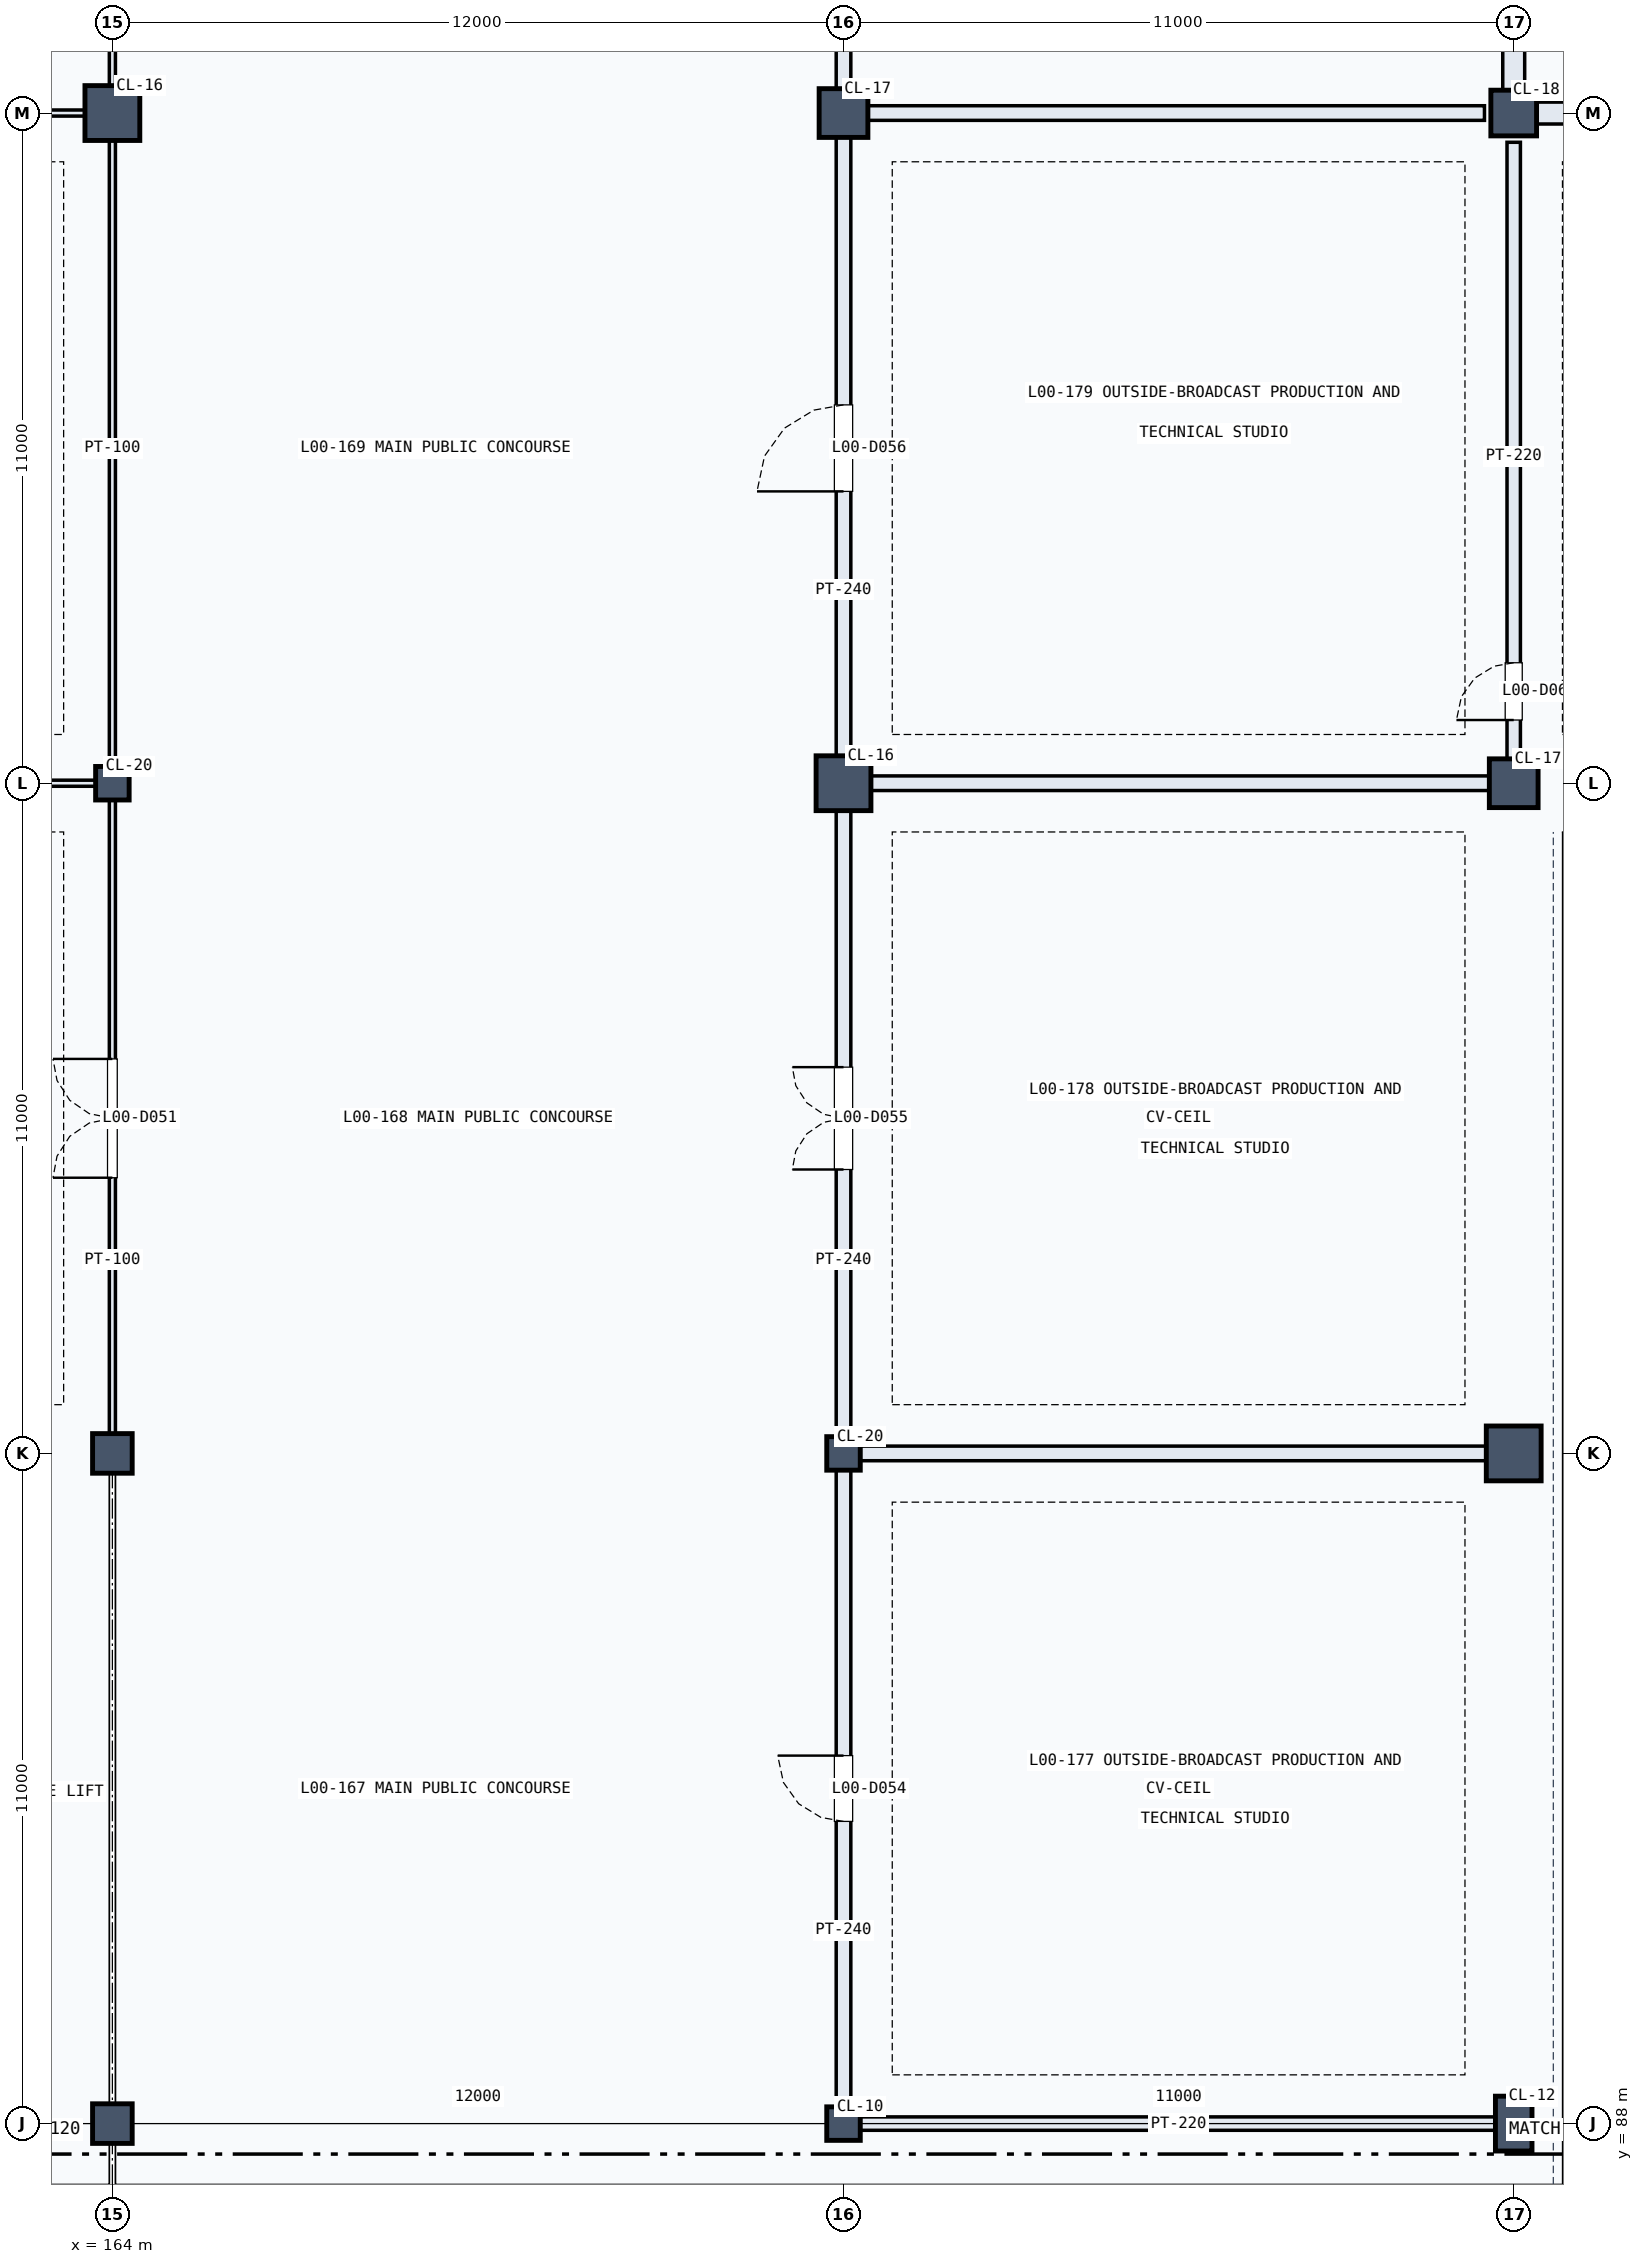
"""IFC4 building model, lengths in metres.
Left out: names, types, materials, properties, quantities, classifications, styles, units other than length and angle.
Written with IfcOpenShell. Run it as: python <this file> out.ifc"""

import sys

from ifc_helpers import new_model, si_unit, direction, frame, frame_2d, origin, origin_2d, place, context, subcontext, project, spatial, rectangle, circle, extrude, element, fill, save


model = new_model("IFC4")
c1 = context("Model", 3, precision=1e-05, world=origin(), true_north=direction((0.0, 1.0)))
c2 = subcontext(c1, "Body", "Model", "MODEL_VIEW")
j1 = project(units=[si_unit("LENGTHUNIT", "METRE"), si_unit("PLANEANGLEUNIT", "RADIAN")], contexts=[c1])
p1 = place(None, origin())
s1 = spatial("IfcSite", under=j1, at=p1, CompositionType="ELEMENT")
p2 = place(p1, origin())
s2 = spatial("IfcBuilding", under=s1, at=p2, CompositionType="ELEMENT")
p3 = place(p2, origin())
s3 = spatial("IfcBuildingStorey", under=s2, at=p3, CompositionType="ELEMENT", Elevation=0.0)
p4 = place(p3, frame((164.0, 88.0, 0.0), z_axis=(0.0, 0.0, 1.0), x_axis=(1.0, 0.0, 0.0)))
e1 = element("IfcColumn", 1, at=p4, inside=s3, PredefinedType="COLUMN", context=c2, shape_type="SweptSolid", body=[
    extrude(rectangle(XDim=0.65, YDim=0.65, at=origin_2d()), origin(), (0.0, 0.0, 1.0), 5.4),
])
p5 = place(p3, frame((164.0, 99.0, 0.0), z_axis=(0.0, 0.0, 1.0), x_axis=(1.0, 0.0, 0.0)))
e2 = element("IfcColumn", 2, at=p5, inside=s3, PredefinedType="COLUMN", context=c2, shape_type="SweptSolid", body=[
    extrude(circle(Radius=0.325, at=origin_2d()), origin(), (0.0, 0.0, 1.0), 5.4),
])
p6 = place(p3, frame((164.0, 110.0, 0.0), z_axis=(0.0, 0.0, 1.0), x_axis=(1.0, 0.0, 0.0)))
e3 = element("IfcColumn", 3, at=p6, inside=s3, PredefinedType="COLUMN", context=c2, shape_type="SweptSolid", body=[
    extrude(circle(Radius=0.275, at=origin_2d()), origin(), (0.0, 0.0, 1.0), 5.4),
])
p7 = place(p3, frame((164.0, 121.0, 0.0), z_axis=(0.0, 0.0, 1.0), x_axis=(1.0, 0.0, 0.0)))
e4 = element("IfcColumn", 4, at=p7, inside=s3, PredefinedType="COLUMN", context=c2, shape_type="SweptSolid", body=[
    extrude(circle(Radius=0.45, at=origin_2d()), origin(), (0.0, 0.0, 1.0), 5.4),
])
p8 = place(p3, frame((176.0, 88.0, 0.0), z_axis=(0.0, 0.0, 1.0), x_axis=(1.0, 0.0, 0.0)))
e5 = element("IfcColumn", 5, at=p8, inside=s3, PredefinedType="COLUMN", context=c2, shape_type="SweptSolid", body=[
    extrude(rectangle(XDim=0.55, YDim=0.55, at=origin_2d()), origin(), (0.0, 0.0, 1.0), 5.4),
])
p9 = place(p3, frame((176.0, 99.0, 0.0), z_axis=(0.0, 0.0, 1.0), x_axis=(1.0, 0.0, 0.0)))
e6 = element("IfcColumn", 6, at=p9, inside=s3, PredefinedType="COLUMN", context=c2, shape_type="SweptSolid", body=[
    extrude(circle(Radius=0.275, at=origin_2d()), origin(), (0.0, 0.0, 1.0), 5.4),
])
p10 = place(p3, frame((176.0, 110.0, 0.0), z_axis=(0.0, 0.0, 1.0), x_axis=(1.0, 0.0, 0.0)))
e7 = element("IfcColumn", 7, at=p10, inside=s3, PredefinedType="COLUMN", context=c2, shape_type="SweptSolid", body=[
    extrude(circle(Radius=0.45, at=origin_2d()), origin(), (0.0, 0.0, 1.0), 5.4),
])
p11 = place(p3, frame((176.0, 121.0, 0.0), z_axis=(0.0, 0.0, 1.0), x_axis=(1.0, 0.0, 0.0)))
e8 = element("IfcColumn", 8, at=p11, inside=s3, PredefinedType="COLUMN", context=c2, shape_type="SweptSolid", body=[
    extrude(circle(Radius=0.4, at=origin_2d()), origin(), (0.0, 0.0, 1.0), 5.4),
])
p12 = place(p3, frame((187.0, 88.0, 0.0), z_axis=(0.0, 0.0, 1.0), x_axis=(1.0, 0.0, 0.0)))
e9 = element("IfcColumn", 9, at=p12, inside=s3, PredefinedType="COLUMN", context=c2, shape_type="SweptSolid", body=[
    extrude(rectangle(XDim=0.6, YDim=0.9, at=origin_2d()), origin(), (0.0, 0.0, 1.0), 5.4),
])
p13 = place(p3, frame((187.0, 99.0, 0.0), z_axis=(0.0, 0.0, 1.0), x_axis=(1.0, 0.0, 0.0)))
e10 = element("IfcColumn", 10, at=p13, inside=s3, PredefinedType="COLUMN", context=c2, shape_type="SweptSolid", body=[
    extrude(circle(Radius=0.45, at=origin_2d()), origin(), (0.0, 0.0, 1.0), 5.4),
])
p14 = place(p3, frame((187.0, 110.0, 0.0), z_axis=(0.0, 0.0, 1.0), x_axis=(1.0, 0.0, 0.0)))
e11 = element("IfcColumn", 11, at=p14, inside=s3, PredefinedType="COLUMN", context=c2, shape_type="SweptSolid", body=[
    extrude(circle(Radius=0.4, at=origin_2d()), origin(), (0.0, 0.0, 1.0), 5.4),
])
p15 = place(p3, frame((187.0, 121.0, 0.0), z_axis=(0.0, 0.0, 1.0), x_axis=(1.0, 0.0, 0.0)))
e12 = element("IfcColumn", 12, at=p15, inside=s3, PredefinedType="COLUMN", context=c2, shape_type="SweptSolid", body=[
    extrude(circle(Radius=0.375, at=origin_2d()), origin(), (0.0, 0.0, 1.0), 5.4),
])
p16 = place(p3, frame((187.0, 121.22, 0.0), z_axis=(0.0, 0.0, 1.0), x_axis=(0.0, 1.0, 0.0)))
e13 = element("IfcWall", 13, at=p16, inside=s3, PredefinedType="SOLIDWALL", context=c2, shape_type="SweptSolid", body=[
    extrude(rectangle(XDim=10.56, YDim=0.36, at=frame_2d((5.28, 0.0))), origin(), (0.0, 0.0, 1.0), 4.55),
])
p17 = place(p16, frame((1.84, 0.0, 0.9)))
e14 = element("IfcOpeningElement", 14, at=p17, cuts=e13, PredefinedType="OPENING", context=c2, shape_type="SweptSolid", body=[
    extrude(rectangle(XDim=1.6, YDim=1.65, at=frame_2d((0.8, 0.825))), frame((0.0, 0.19, 0.0), z_axis=(0.0, -1.0, 0.0), x_axis=(1.0, 0.0, 0.0)), (0.0, 0.0, 1.0), 0.38),
])
p18 = place(p16, frame((4.48, 0.0, 0.9)))
e15 = element("IfcOpeningElement", 15, at=p18, cuts=e13, PredefinedType="OPENING", context=c2, shape_type="SweptSolid", body=[
    extrude(rectangle(XDim=1.6, YDim=1.65, at=frame_2d((0.8, 0.825))), frame((0.0, 0.19, 0.0), z_axis=(0.0, -1.0, 0.0), x_axis=(1.0, 0.0, 0.0)), (0.0, 0.0, 1.0), 0.38),
])
p19 = place(p16, frame((7.12, 0.0, 0.9)))
e16 = element("IfcOpeningElement", 16, at=p19, cuts=e13, PredefinedType="OPENING", context=c2, shape_type="SweptSolid", body=[
    extrude(rectangle(XDim=1.6, YDim=1.65, at=frame_2d((0.8, 0.825))), frame((0.0, 0.19, 0.0), z_axis=(0.0, -1.0, 0.0), x_axis=(1.0, 0.0, 0.0)), (0.0, 0.0, 1.0), 0.38),
])
p20 = place(p3, frame((187.22, 121.0, 0.0), z_axis=(0.0, 0.0, 1.0), x_axis=(1.0, 0.0, 0.0)))
e17 = element("IfcWall", 17, at=p20, inside=s3, PredefinedType="SOLIDWALL", context=c2, shape_type="SweptSolid", body=[
    extrude(rectangle(XDim=10.56, YDim=0.36, at=frame_2d((5.28, 0.0))), origin(), (0.0, 0.0, 1.0), 4.55),
])
p21 = place(p20, frame((2.88, 0.0, 0.0)))
e18 = element("IfcOpeningElement", 18, at=p21, cuts=e17, PredefinedType="OPENING", context=c2, shape_type="SweptSolid", body=[
    extrude(rectangle(XDim=4.8, YDim=4.35, at=frame_2d((2.4, 2.175))), frame((0.0, 0.19, 0.0), z_axis=(0.0, -1.0, 0.0), x_axis=(1.0, 0.0, 0.0)), (0.0, 0.0, 1.0), 0.38),
])
p22 = place(p3, frame((164.0, 99.22, 0.0), z_axis=(0.0, 0.0, 1.0), x_axis=(0.0, 1.0, 0.0)))
e19 = element("IfcWall", 19, at=p22, inside=s3, PredefinedType="PARTITIONING", context=c2, shape_type="SweptSolid", body=[
    extrude(rectangle(XDim=10.56, YDim=0.1, at=frame_2d((5.28, 0.0))), origin(), (0.0, 0.0, 1.0), 4.3),
])
p23 = place(p22, frame((4.305, 0.0, 0.0)))
e20 = element("IfcOpeningElement", 20, at=p23, cuts=e19, PredefinedType="OPENING", context=c2, shape_type="SweptSolid", body=[
    extrude(rectangle(XDim=1.95, YDim=2.4, at=frame_2d((0.975, 1.2))), frame((0.0, 0.06, 0.0), z_axis=(0.0, -1.0, 0.0), x_axis=(1.0, 0.0, 0.0)), (0.0, 0.0, 1.0), 0.12),
])
p24 = place(p3, frame((164.0, 110.22, 0.0), z_axis=(0.0, 0.0, 1.0), x_axis=(0.0, 1.0, 0.0)))
e21 = element("IfcWall", 21, at=p24, inside=s3, PredefinedType="PARTITIONING", context=c2, shape_type="SweptSolid", body=[
    extrude(rectangle(XDim=10.56, YDim=0.1, at=frame_2d((5.28, 0.0))), origin(), (0.0, 0.0, 1.0), 4.35),
])
p25 = place(p3, frame((164.0, 121.22, 0.0), z_axis=(0.0, 0.0, 1.0), x_axis=(0.0, 1.0, 0.0)))
e22 = element("IfcWall", 22, at=p25, inside=s3, PredefinedType="PARTITIONING", context=c2, shape_type="SweptSolid", body=[
    extrude(rectangle(XDim=10.3, YDim=0.1, at=frame_2d((5.15, 0.0))), origin(), (0.0, 0.0, 1.0), 4.45),
])
p26 = place(p3, frame((176.0, 88.22, 0.0), z_axis=(0.0, 0.0, 1.0), x_axis=(0.0, 1.0, 0.0)))
e23 = element("IfcWall", 23, at=p26, inside=s3, PredefinedType="PARTITIONING", context=c2, shape_type="SweptSolid", body=[
    extrude(rectangle(XDim=10.56, YDim=0.24, at=frame_2d((5.28, 0.0))), origin(), (0.0, 0.0, 1.0), 4.366),
])
p27 = place(p26, frame((4.74, 0.0, 0.0)))
e24 = element("IfcOpeningElement", 24, at=p27, cuts=e23, PredefinedType="OPENING", context=c2, shape_type="SweptSolid", body=[
    extrude(rectangle(XDim=1.08, YDim=2.15, at=frame_2d((0.54, 1.075))), frame((0.0, 0.13, 0.0), z_axis=(0.0, -1.0, 0.0), x_axis=(1.0, 0.0, 0.0)), (0.0, 0.0, 1.0), 0.26),
])
p28 = place(p3, frame((176.0, 99.22, 0.0), z_axis=(0.0, 0.0, 1.0), x_axis=(0.0, 1.0, 0.0)))
e25 = element("IfcWall", 25, at=p28, inside=s3, PredefinedType="PARTITIONING", context=c2, shape_type="SweptSolid", body=[
    extrude(rectangle(XDim=10.56, YDim=0.24, at=frame_2d((5.28, 0.0))), origin(), (0.0, 0.0, 1.0), 4.15),
])
p29 = place(p28, frame((4.44, 0.0, 0.0)))
e26 = element("IfcOpeningElement", 26, at=p29, cuts=e25, PredefinedType="OPENING", context=c2, shape_type="SweptSolid", body=[
    extrude(rectangle(XDim=1.68, YDim=2.2, at=frame_2d((0.84, 1.1))), frame((0.0, 0.13, 0.0), z_axis=(0.0, -1.0, 0.0), x_axis=(1.0, 0.0, 0.0)), (0.0, 0.0, 1.0), 0.26),
])
p30 = place(p3, frame((176.0, 110.22, 0.0), z_axis=(0.0, 0.0, 1.0), x_axis=(0.0, 1.0, 0.0)))
e27 = element("IfcWall", 27, at=p30, inside=s3, PredefinedType="PARTITIONING", context=c2, shape_type="SweptSolid", body=[
    extrude(rectangle(XDim=10.56, YDim=0.24, at=frame_2d((5.28, 0.0))), origin(), (0.0, 0.0, 1.0), 4.15),
])
p31 = place(p30, frame((4.57, 0.0, 0.0)))
e28 = element("IfcOpeningElement", 28, at=p31, cuts=e27, PredefinedType="OPENING", context=c2, shape_type="SweptSolid", body=[
    extrude(rectangle(XDim=1.42, YDim=2.25, at=frame_2d((0.71, 1.125))), frame((0.0, 0.13, 0.0), z_axis=(0.0, -1.0, 0.0), x_axis=(1.0, 0.0, 0.0)), (0.0, 0.0, 1.0), 0.26),
])
p32 = place(p3, frame((176.0, 121.22, 0.0), z_axis=(0.0, 0.0, 1.0), x_axis=(0.0, 1.0, 0.0)))
e29 = element("IfcWall", 29, at=p32, inside=s3, PredefinedType="PARTITIONING", context=c2, shape_type="SweptSolid", body=[
    extrude(rectangle(XDim=10.3, YDim=0.24, at=frame_2d((5.15, 0.0))), origin(), (0.0, 0.0, 1.0), 4.438),
])
p33 = place(p32, frame((4.275, 0.0, 0.0)))
e30 = element("IfcOpeningElement", 30, at=p33, cuts=e29, PredefinedType="OPENING", context=c2, shape_type="SweptSolid", body=[
    extrude(rectangle(XDim=1.75, YDim=2.25, at=frame_2d((0.875, 1.125))), frame((0.0, 0.13, 0.0), z_axis=(0.0, -1.0, 0.0), x_axis=(1.0, 0.0, 0.0)), (0.0, 0.0, 1.0), 0.26),
])
p34 = place(p3, frame((176.22, 88.0, 0.0), z_axis=(0.0, 0.0, 1.0), x_axis=(1.0, 0.0, 0.0)))
e31 = element("IfcWall", 31, at=p34, inside=s3, PredefinedType="PARTITIONING", context=c2, shape_type="SweptSolid", body=[
    extrude(rectangle(XDim=10.56, YDim=0.22, at=frame_2d((5.28, 0.0))), origin(), (0.0, 0.0, 1.0), 4.366),
])
p35 = place(p3, frame((152.22, 110.0, 0.0), z_axis=(0.0, 0.0, 1.0), x_axis=(1.0, 0.0, 0.0)))
e32 = element("IfcWall", 32, at=p35, inside=s3, PredefinedType="PARTITIONING", context=c2, shape_type="SweptSolid", body=[
    extrude(rectangle(XDim=11.56, YDim=0.1, at=frame_2d((5.78, 0.0))), origin(), (0.0, 0.0, 1.0), 4.1),
])
p36 = place(p3, frame((152.22, 121.0, 0.0), z_axis=(0.0, 0.0, 1.0), x_axis=(1.0, 0.0, 0.0)))
e33 = element("IfcWall", 33, at=p36, inside=s3, PredefinedType="PARTITIONING", context=c2, shape_type="SweptSolid", body=[
    extrude(rectangle(XDim=11.56, YDim=0.1, at=frame_2d((5.78, 0.0))), origin(), (0.0, 0.0, 1.0), 4.25),
])
p37 = place(p3, frame((176.22, 99.0, 0.0), z_axis=(0.0, 0.0, 1.0), x_axis=(1.0, 0.0, 0.0)))
e34 = element("IfcWall", 34, at=p37, inside=s3, PredefinedType="PARTITIONING", context=c2, shape_type="SweptSolid", body=[
    extrude(rectangle(XDim=10.56, YDim=0.24, at=frame_2d((5.28, 0.0))), origin(), (0.0, 0.0, 1.0), 4.366),
])
p38 = place(p3, frame((176.22, 110.0, 0.0), z_axis=(0.0, 0.0, 1.0), x_axis=(1.0, 0.0, 0.0)))
e35 = element("IfcWall", 35, at=p38, inside=s3, PredefinedType="PARTITIONING", context=c2, shape_type="SweptSolid", body=[
    extrude(rectangle(XDim=10.56, YDim=0.24, at=frame_2d((5.28, 0.0))), origin(), (0.0, 0.0, 1.0), 4.1),
])
p39 = place(p3, frame((176.22, 121.0, 0.0), z_axis=(0.0, 0.0, 1.0), x_axis=(1.0, 0.0, 0.0)))
e36 = element("IfcWall", 36, at=p39, inside=s3, PredefinedType="PARTITIONING", context=c2, shape_type="SweptSolid", body=[
    extrude(rectangle(XDim=10.3, YDim=0.24, at=frame_2d((5.15, 0.0))), origin(), (0.0, 0.0, 1.0), 4.438),
])
p40 = place(p3, frame((187.0, 110.22, 0.0), z_axis=(0.0, 0.0, 1.0), x_axis=(0.0, 1.0, 0.0)))
e37 = element("IfcWall", 37, at=p40, inside=s3, PredefinedType="PARTITIONING", context=c2, shape_type="SweptSolid", body=[
    extrude(rectangle(XDim=10.3, YDim=0.22, at=frame_2d((5.15, 0.0))), origin(), (0.0, 0.0, 1.0), 4.1),
])
p41 = place(p40, frame((0.817, 0.0, 0.0)))
e38 = element("IfcOpeningElement", 38, at=p41, cuts=e37, PredefinedType="OPENING", context=c2, shape_type="SweptSolid", body=[
    extrude(rectangle(XDim=0.94, YDim=2.15, at=frame_2d((0.47, 1.075))), frame((0.0, 0.12, 0.0), z_axis=(0.0, -1.0, 0.0), x_axis=(1.0, 0.0, 0.0)), (0.0, 0.0, 1.0), 0.24),
])
p42 = place(p23, origin())
e39 = element("IfcDoor", 39, at=p42, inside=s3, OperationType="DOUBLE_DOOR_SINGLE_SWING", PredefinedType="DOOR", context=c2, shape_type="SweptSolid", body=[
    extrude(rectangle(XDim=1.95, YDim=2.4, at=frame_2d((0.975, 1.2))), frame((0.0, 0.025, 0.0), z_axis=(0.0, -1.0, 0.0), x_axis=(1.0, 0.0, 0.0)), (0.0, 0.0, 1.0), 0.05),
])
fill(e20, e39)
p43 = place(p27, origin())
e40 = element("IfcDoor", 40, at=p43, inside=s3, OperationType="SINGLE_SWING_RIGHT", PredefinedType="DOOR", context=c2, shape_type="SweptSolid", body=[
    extrude(rectangle(XDim=1.08, YDim=2.15, at=frame_2d((0.54, 1.075))), frame((0.0, 0.025, 0.0), z_axis=(0.0, -1.0, 0.0), x_axis=(1.0, 0.0, 0.0)), (0.0, 0.0, 1.0), 0.05),
])
fill(e24, e40)
p44 = place(p29, origin())
e41 = element("IfcDoor", 41, at=p44, inside=s3, OperationType="DOUBLE_DOOR_SINGLE_SWING", PredefinedType="DOOR", context=c2, shape_type="SweptSolid", body=[
    extrude(rectangle(XDim=1.68, YDim=2.2, at=frame_2d((0.84, 1.1))), frame((0.0, 0.025, 0.0), z_axis=(0.0, -1.0, 0.0), x_axis=(1.0, 0.0, 0.0)), (0.0, 0.0, 1.0), 0.05),
])
fill(e26, e41)
p45 = place(p31, origin())
e42 = element("IfcDoor", 42, at=p45, inside=s3, OperationType="SINGLE_SWING_LEFT", PredefinedType="DOOR", context=c2, shape_type="SweptSolid", body=[
    extrude(rectangle(XDim=1.42, YDim=2.25, at=frame_2d((0.71, 1.125))), frame((0.0, 0.025, 0.0), z_axis=(0.0, -1.0, 0.0), x_axis=(1.0, 0.0, 0.0)), (0.0, 0.0, 1.0), 0.05),
])
fill(e28, e42)
p46 = place(p41, origin())
e43 = element("IfcDoor", 43, at=p46, inside=s3, OperationType="SINGLE_SWING_LEFT", PredefinedType="DOOR", context=c2, shape_type="SweptSolid", body=[
    extrude(rectangle(XDim=0.94, YDim=2.15, at=frame_2d((0.47, 1.075))), frame((0.0, 0.025, 0.0), z_axis=(0.0, -1.0, 0.0), x_axis=(1.0, 0.0, 0.0)), (0.0, 0.0, 1.0), 0.05),
])
fill(e38, e43)
save(model, sys.argv[1])
